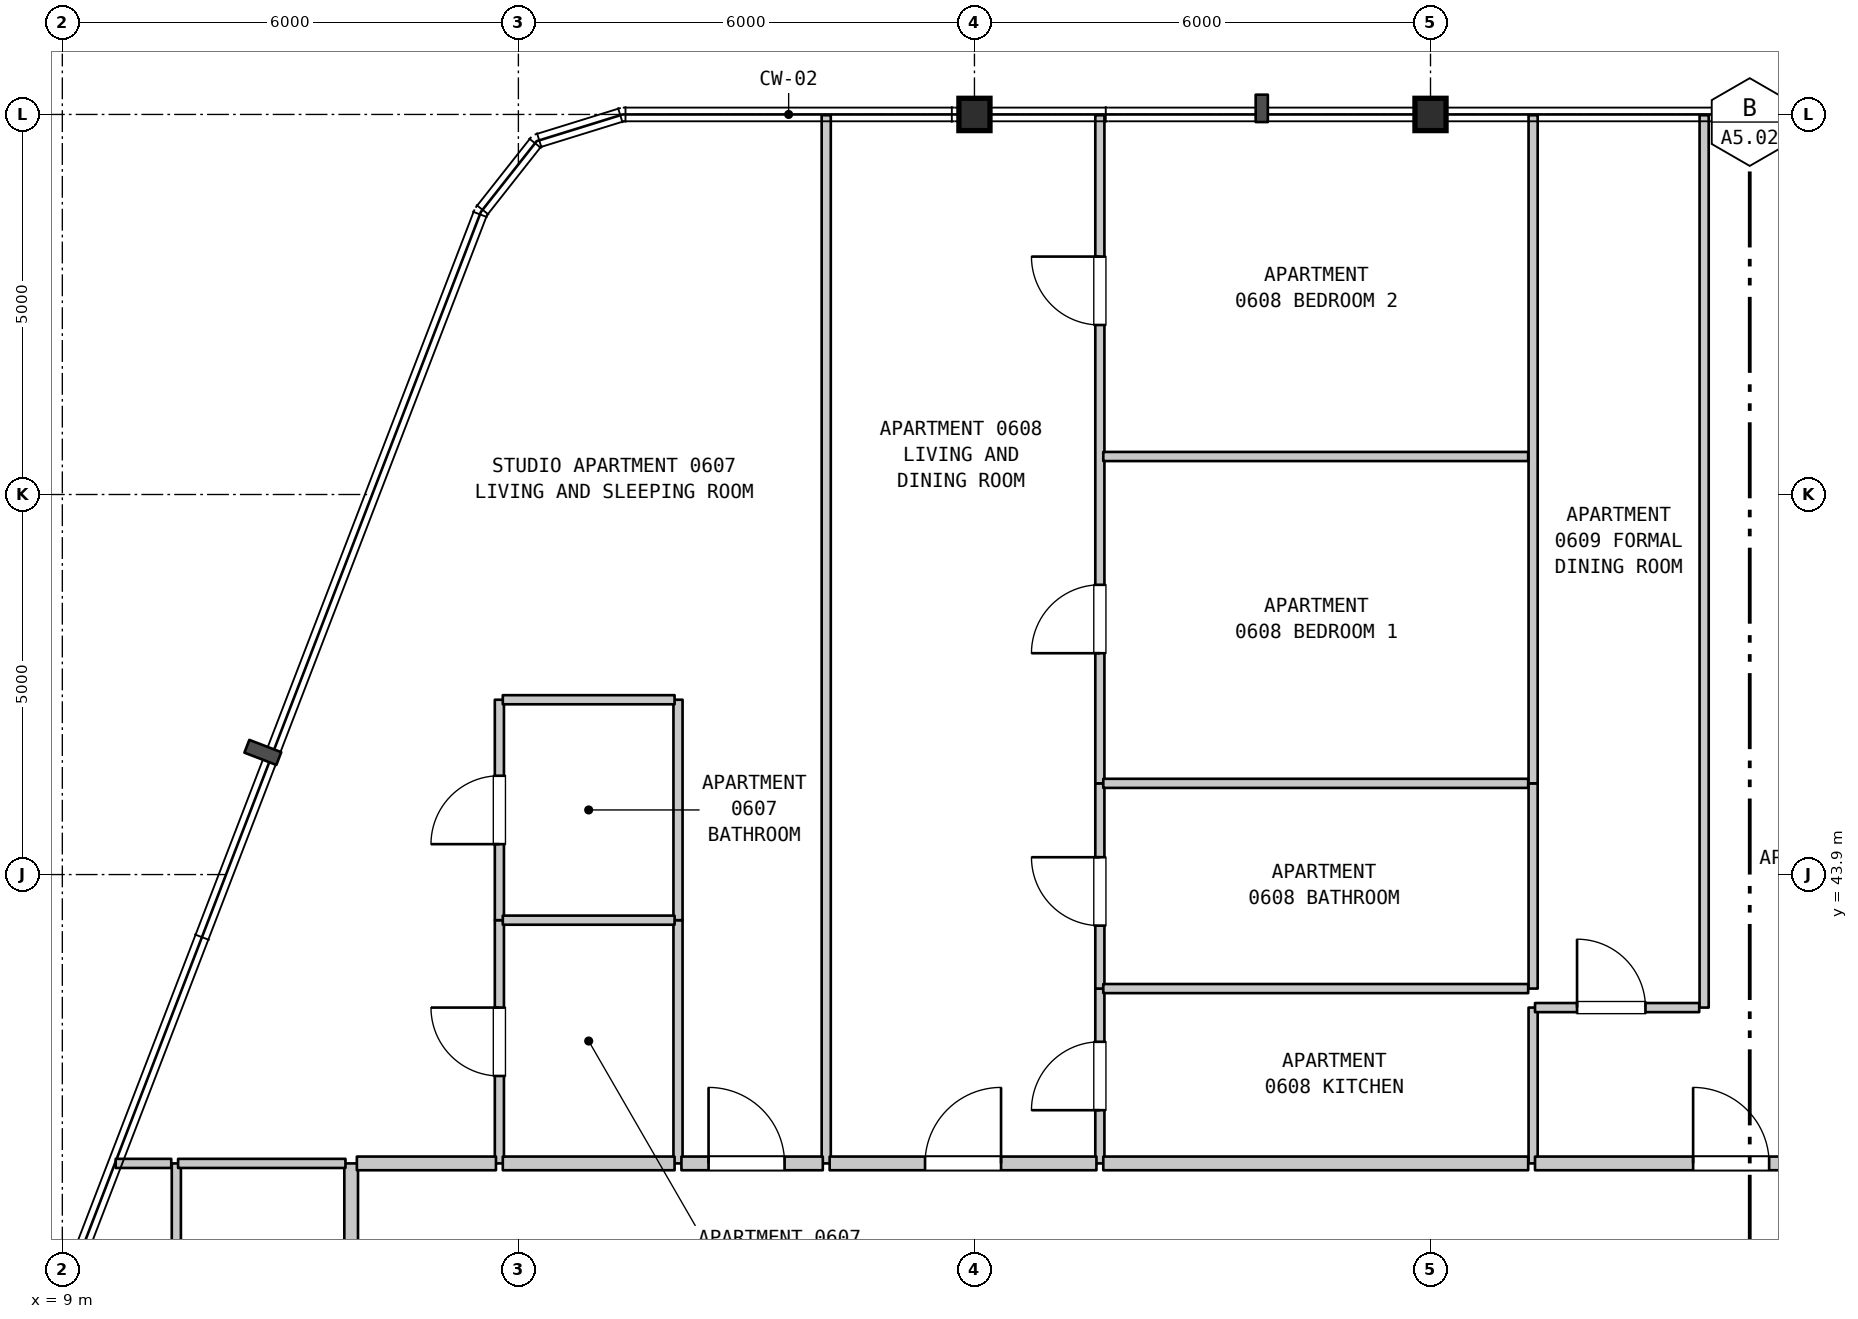
"""IFC4 building model, lengths in metres.
Left out: names, types, materials, properties, quantities, classifications, styles, units other than length and angle.
Written with IfcOpenShell. Run it as: python <this file> out.ifc"""

import sys

from ifc_helpers import new_model, si_unit, direction, frame, frame_2d, origin, origin_2d, place, context, subcontext, project, spatial, rectangle, i_section, extrude, element, fill, save


model = new_model("IFC4")
c1 = context("Model", 3, precision=1e-05, world=origin(), true_north=direction((0.0, 1.0)))
c2 = subcontext(c1, "Body", "Model", "MODEL_VIEW")
j1 = project(units=[si_unit("LENGTHUNIT", "METRE"), si_unit("PLANEANGLEUNIT", "RADIAN")], contexts=[c1])
p1 = place(None, origin())
s1 = spatial("IfcSite", under=j1, at=p1, CompositionType="ELEMENT")
p2 = place(p1, origin())
s2 = spatial("IfcBuilding", under=s1, at=p2, CompositionType="ELEMENT")
p3 = place(p2, frame((0.0, 0.0, 31.4)))
s3 = spatial("IfcBuildingStorey", under=s2, at=p3, CompositionType="ELEMENT", Elevation=31.4)
for number, where, z_axis, x_axis in (
    (1, (21.0, 53.9, 0.0), (0.0, 0.0, 1.0), (1.0, 0.0, 0.0)),
    (2, (27.0, 53.9, 0.0), (0.0, 0.0, 1.0), (1.0, 0.0, 0.0)),
):
    element("IfcColumn", number, at=place(p3, frame(where, z_axis=z_axis, x_axis=x_axis)), inside=s3, PredefinedType="COLUMN", context=c2, shape_type="SweptSolid", body=[
        extrude(i_section(OverallWidth=0.409, OverallDepth=0.425, WebThickness=0.032, FlangeThickness=0.052, FilletRadius=0.015, at=origin_2d()), origin(), (0.0, 0.0, 1.0), 3.7),
    ])
p4 = place(p3, frame((10.5, 31.45, 0.0), z_axis=(0.0, 0.0, 1.0), x_axis=(0.0, 1.0, 0.0)))
e3 = element("IfcWall", 3, at=p4, inside=s3, PredefinedType="PARTITIONING", context=c2, shape_type="SweptSolid", body=[
    extrude(rectangle(XDim=8.65, YDim=0.12, at=frame_2d((4.325, 0.0))), origin(), (0.0, 0.0, 1.0), 3.385),
])
p5 = place(p3, frame((12.8, 31.45, 0.0), z_axis=(0.0, 0.0, 1.0), x_axis=(0.0, 1.0, 0.0)))
e4 = element("IfcWall", 4, at=p5, inside=s3, PredefinedType="STANDARD", context=c2, shape_type="SweptSolid", body=[
    extrude(rectangle(XDim=8.65, YDim=0.18, at=frame_2d((4.325, 0.0))), origin(), (0.0, 0.0, 1.0), 3.385),
])
p6 = place(p3, frame((14.75, 40.1, 0.0), z_axis=(0.0, 0.0, 1.0), x_axis=(0.0, 1.0, 0.0)))
e5 = element("IfcWall", 5, at=p6, inside=s3, PredefinedType="PARTITIONING", context=c2, shape_type="SweptSolid", body=[
    extrude(rectangle(XDim=3.2, YDim=0.12, at=frame_2d((1.6, 0.0))), origin(), (0.0, 0.0, 1.0), 3.385),
])
p7 = place(p6, frame((1.15, 0.0, 0.0)))
e6 = element("IfcOpeningElement", 6, at=p7, cuts=e5, PredefinedType="OPENING", context=c2, shape_type="SweptSolid", body=[
    extrude(rectangle(XDim=0.9, YDim=2.15, at=frame_2d((0.45, 1.075))), frame((0.0, 0.07, 0.0), z_axis=(0.0, -1.0, 0.0), x_axis=(1.0, 0.0, 0.0)), (0.0, 0.0, 1.0), 0.14),
])
p8 = place(p3, frame((14.75, 43.3, 0.0), z_axis=(0.0, 0.0, 1.0), x_axis=(0.0, 1.0, 0.0)))
e7 = element("IfcWall", 7, at=p8, inside=s3, PredefinedType="PARTITIONING", context=c2, shape_type="SweptSolid", body=[
    extrude(rectangle(XDim=2.9, YDim=0.12, at=frame_2d((1.45, 0.0))), origin(), (0.0, 0.0, 1.0), 3.385),
])
p9 = place(p8, frame((1.0, 0.0, 0.0)))
e8 = element("IfcOpeningElement", 8, at=p9, cuts=e7, PredefinedType="OPENING", context=c2, shape_type="SweptSolid", body=[
    extrude(rectangle(XDim=0.9, YDim=2.1, at=frame_2d((0.45, 1.05))), frame((0.0, 0.07, 0.0), z_axis=(0.0, -1.0, 0.0), x_axis=(1.0, 0.0, 0.0)), (0.0, 0.0, 1.0), 0.14),
])
p10 = place(p3, frame((17.1, 40.1, 0.0), z_axis=(0.0, 0.0, 1.0), x_axis=(0.0, 1.0, 0.0)))
e9 = element("IfcWall", 9, at=p10, inside=s3, PredefinedType="PARTITIONING", context=c2, shape_type="SweptSolid", body=[
    extrude(rectangle(XDim=3.2, YDim=0.12, at=frame_2d((1.6, 0.0))), origin(), (0.0, 0.0, 1.0), 3.385),
])
p11 = place(p3, frame((17.1, 43.3, 0.0), z_axis=(0.0, 0.0, 1.0), x_axis=(0.0, 1.0, 0.0)))
e10 = element("IfcWall", 10, at=p11, inside=s3, PredefinedType="PARTITIONING", context=c2, shape_type="SweptSolid", body=[
    extrude(rectangle(XDim=2.9, YDim=0.12, at=frame_2d((1.45, 0.0))), origin(), (0.0, 0.0, 1.0), 3.385),
])
p12 = place(p3, frame((19.05, 40.1, 0.0), z_axis=(0.0, 0.0, 1.0), x_axis=(0.0, 1.0, 0.0)))
e11 = element("IfcWall", 11, at=p12, inside=s3, PredefinedType="PARTITIONING", context=c2, shape_type="SweptSolid", body=[
    extrude(rectangle(XDim=13.79, YDim=0.12, at=frame_2d((6.895, 0.0))), origin(), (0.0, 0.0, 1.0), 3.385),
])
p13 = place(p3, frame((22.65, 40.1, 0.0), z_axis=(0.0, 0.0, 1.0), x_axis=(0.0, 1.0, 0.0)))
e12 = element("IfcWall", 12, at=p13, inside=s3, PredefinedType="PARTITIONING", context=c2, shape_type="SweptSolid", body=[
    extrude(rectangle(XDim=2.3, YDim=0.12, at=frame_2d((1.15, 0.0))), origin(), (0.0, 0.0, 1.0), 3.385),
])
p14 = place(p13, frame((0.7, 0.0, 0.0)))
e13 = element("IfcOpeningElement", 13, at=p14, cuts=e12, PredefinedType="OPENING", context=c2, shape_type="SweptSolid", body=[
    extrude(rectangle(XDim=0.9, YDim=2.15, at=frame_2d((0.45, 1.075))), frame((0.0, 0.07, 0.0), z_axis=(0.0, -1.0, 0.0), x_axis=(1.0, 0.0, 0.0)), (0.0, 0.0, 1.0), 0.14),
])
p15 = place(p3, frame((22.65, 42.4, 0.0), z_axis=(0.0, 0.0, 1.0), x_axis=(0.0, 1.0, 0.0)))
e14 = element("IfcWall", 14, at=p15, inside=s3, PredefinedType="PARTITIONING", context=c2, shape_type="SweptSolid", body=[
    extrude(rectangle(XDim=2.7, YDim=0.12, at=frame_2d((1.35, 0.0))), origin(), (0.0, 0.0, 1.0), 3.385),
])
p16 = place(p15, frame((0.828, 0.0, 0.0)))
e15 = element("IfcOpeningElement", 15, at=p16, cuts=e14, PredefinedType="OPENING", context=c2, shape_type="SweptSolid", body=[
    extrude(rectangle(XDim=0.9, YDim=2.1, at=frame_2d((0.45, 1.05))), frame((0.0, 0.07, 0.0), z_axis=(0.0, -1.0, 0.0), x_axis=(1.0, 0.0, 0.0)), (0.0, 0.0, 1.0), 0.14),
])
p17 = place(p3, frame((22.65, 45.1, 0.0), z_axis=(0.0, 0.0, 1.0), x_axis=(0.0, 1.0, 0.0)))
e16 = element("IfcWall", 16, at=p17, inside=s3, PredefinedType="PARTITIONING", context=c2, shape_type="SweptSolid", body=[
    extrude(rectangle(XDim=8.79, YDim=0.12, at=frame_2d((4.395, 0.0))), origin(), (0.0, 0.0, 1.0), 3.385),
])
p18 = place(p17, frame((1.712, 0.0, 0.0)))
e17 = element("IfcOpeningElement", 17, at=p18, cuts=e16, PredefinedType="OPENING", context=c2, shape_type="SweptSolid", body=[
    extrude(rectangle(XDim=0.9, YDim=2.15, at=frame_2d((0.45, 1.075))), frame((0.0, 0.07, 0.0), z_axis=(0.0, -1.0, 0.0), x_axis=(1.0, 0.0, 0.0)), (0.0, 0.0, 1.0), 0.14),
])
p19 = place(p17, frame((6.03, 0.0, 0.0)))
e18 = element("IfcOpeningElement", 18, at=p19, cuts=e16, PredefinedType="OPENING", context=c2, shape_type="SweptSolid", body=[
    extrude(rectangle(XDim=0.9, YDim=2.15, at=frame_2d((0.45, 1.075))), frame((0.0, 0.07, 0.0), z_axis=(0.0, -1.0, 0.0), x_axis=(1.0, 0.0, 0.0)), (0.0, 0.0, 1.0), 0.14),
])
p20 = place(p3, frame((28.35, 40.1, 0.0), z_axis=(0.0, 0.0, 1.0), x_axis=(0.0, 1.0, 0.0)))
e19 = element("IfcWall", 19, at=p20, inside=s3, PredefinedType="PARTITIONING", context=c2, shape_type="SweptSolid", body=[
    extrude(rectangle(XDim=2.05, YDim=0.12, at=frame_2d((1.025, 0.0))), origin(), (0.0, 0.0, 1.0), 3.385),
])
p21 = place(p3, frame((28.35, 42.4, 0.0), z_axis=(0.0, 0.0, 1.0), x_axis=(0.0, 1.0, 0.0)))
e20 = element("IfcWall", 20, at=p21, inside=s3, PredefinedType="PARTITIONING", context=c2, shape_type="SweptSolid", body=[
    extrude(rectangle(XDim=2.7, YDim=0.12, at=frame_2d((1.35, 0.0))), origin(), (0.0, 0.0, 1.0), 3.385),
])
p22 = place(p3, frame((28.35, 45.1, 0.0), z_axis=(0.0, 0.0, 1.0), x_axis=(0.0, 1.0, 0.0)))
e21 = element("IfcWall", 21, at=p22, inside=s3, PredefinedType="PARTITIONING", context=c2, shape_type="SweptSolid", body=[
    extrude(rectangle(XDim=8.79, YDim=0.12, at=frame_2d((4.395, 0.0))), origin(), (0.0, 0.0, 1.0), 3.385),
])
p23 = place(p3, frame((30.6, 42.15, 0.0), z_axis=(0.0, 0.0, 1.0), x_axis=(0.0, 1.0, 0.0)))
e22 = element("IfcWall", 22, at=p23, inside=s3, PredefinedType="PARTITIONING", context=c2, shape_type="SweptSolid", body=[
    extrude(rectangle(XDim=11.74, YDim=0.12, at=frame_2d((5.87, 0.0))), origin(), (0.0, 0.0, 1.0), 3.385),
])
p24 = place(p3, frame((9.702, 40.1, 0.0), z_axis=(0.0, 0.0, 1.0), x_axis=(1.0, 0.0, 0.0)))
e23 = element("IfcWall", 23, at=p24, inside=s3, PredefinedType="PARTITIONING", context=c2, shape_type="SweptSolid", body=[
    extrude(rectangle(XDim=0.731, YDim=0.12, at=frame_2d((0.366, 0.0))), origin(), (0.0, 0.0, 1.0), 3.385),
])
p25 = place(p3, frame((10.523, 40.1, 0.0), z_axis=(0.0, 0.0, 1.0), x_axis=(1.0, 0.0, 0.0)))
e24 = element("IfcWall", 24, at=p25, inside=s3, PredefinedType="PARTITIONING", context=c2, shape_type="SweptSolid", body=[
    extrude(rectangle(XDim=2.202, YDim=0.12, at=frame_2d((1.101, 0.0))), origin(), (0.0, 0.0, 1.0), 3.385),
])
p26 = place(p3, frame((12.875, 40.1, 0.0), z_axis=(0.0, 0.0, 1.0), x_axis=(1.0, 0.0, 0.0)))
e25 = element("IfcWall", 25, at=p26, inside=s3, PredefinedType="STANDARD", context=c2, shape_type="SweptSolid", body=[
    extrude(rectangle(XDim=1.83, YDim=0.18, at=frame_2d((0.915, 0.0))), origin(), (0.0, 0.0, 1.0), 3.385),
])
p27 = place(p3, frame((14.795, 40.1, 0.0), z_axis=(0.0, 0.0, 1.0), x_axis=(1.0, 0.0, 0.0)))
e26 = element("IfcWall", 26, at=p27, inside=s3, PredefinedType="STANDARD", context=c2, shape_type="SweptSolid", body=[
    extrude(rectangle(XDim=2.26, YDim=0.18, at=frame_2d((1.13, 0.0))), origin(), (0.0, 0.0, 1.0), 3.385),
])
p28 = place(p3, frame((17.145, 40.1, 0.0), z_axis=(0.0, 0.0, 1.0), x_axis=(1.0, 0.0, 0.0)))
e27 = element("IfcWall", 27, at=p28, inside=s3, PredefinedType="STANDARD", context=c2, shape_type="SweptSolid", body=[
    extrude(rectangle(XDim=1.86, YDim=0.18, at=frame_2d((0.93, 0.0))), origin(), (0.0, 0.0, 1.0), 3.385),
])
p29 = place(p28, frame((0.357, 0.0, 0.0)))
e28 = element("IfcOpeningElement", 28, at=p29, cuts=e27, PredefinedType="OPENING", context=c2, shape_type="SweptSolid", body=[
    extrude(rectangle(XDim=1.0, YDim=2.15, at=frame_2d((0.5, 1.075))), frame((0.0, 0.1, 0.0), z_axis=(0.0, -1.0, 0.0), x_axis=(1.0, 0.0, 0.0)), (0.0, 0.0, 1.0), 0.2),
])
p30 = place(p3, frame((19.095, 40.1, 0.0), z_axis=(0.0, 0.0, 1.0), x_axis=(1.0, 0.0, 0.0)))
e29 = element("IfcWall", 29, at=p30, inside=s3, PredefinedType="STANDARD", context=c2, shape_type="SweptSolid", body=[
    extrude(rectangle(XDim=3.51, YDim=0.18, at=frame_2d((1.755, 0.0))), origin(), (0.0, 0.0, 1.0), 3.385),
])
p31 = place(p30, frame((1.255, 0.0, 0.0)))
e30 = element("IfcOpeningElement", 30, at=p31, cuts=e29, PredefinedType="OPENING", context=c2, shape_type="SweptSolid", body=[
    extrude(rectangle(XDim=1.0, YDim=2.15, at=frame_2d((0.5, 1.075))), frame((0.0, 0.1, 0.0), z_axis=(0.0, -1.0, 0.0), x_axis=(1.0, 0.0, 0.0)), (0.0, 0.0, 1.0), 0.2),
])
p32 = place(p3, frame((22.695, 40.1, 0.0), z_axis=(0.0, 0.0, 1.0), x_axis=(1.0, 0.0, 0.0)))
e31 = element("IfcWall", 31, at=p32, inside=s3, PredefinedType="STANDARD", context=c2, shape_type="SweptSolid", body=[
    extrude(rectangle(XDim=5.59, YDim=0.18, at=frame_2d((2.795, 0.0))), origin(), (0.0, 0.0, 1.0), 3.385),
])
p33 = place(p3, frame((28.375, 40.1, 0.0), z_axis=(0.0, 0.0, 1.0), x_axis=(1.0, 0.0, 0.0)))
e32 = element("IfcWall", 32, at=p33, inside=s3, PredefinedType="STANDARD", context=c2, shape_type="SweptSolid", body=[
    extrude(rectangle(XDim=5.095, YDim=0.18, at=frame_2d((2.547, 0.0))), origin(), (0.0, 0.0, 1.0), 3.385),
])
p34 = place(p33, frame((2.08, 0.0, 0.0)))
e33 = element("IfcOpeningElement", 33, at=p34, cuts=e32, PredefinedType="OPENING", context=c2, shape_type="SweptSolid", body=[
    extrude(rectangle(XDim=1.0, YDim=2.15, at=frame_2d((0.5, 1.075))), frame((0.0, 0.1, 0.0), z_axis=(0.0, -1.0, 0.0), x_axis=(1.0, 0.0, 0.0)), (0.0, 0.0, 1.0), 0.2),
])
p35 = place(p3, frame((28.375, 42.15, 0.0), z_axis=(0.0, 0.0, 1.0), x_axis=(1.0, 0.0, 0.0)))
e34 = element("IfcWall", 34, at=p35, inside=s3, PredefinedType="PARTITIONING", context=c2, shape_type="SweptSolid", body=[
    extrude(rectangle(XDim=2.16, YDim=0.12, at=frame_2d((1.08, 0.0))), origin(), (0.0, 0.0, 1.0), 3.385),
])
p36 = place(p35, frame((0.553, 0.0, 0.0)))
e35 = element("IfcOpeningElement", 35, at=p36, cuts=e34, PredefinedType="OPENING", context=c2, shape_type="SweptSolid", body=[
    extrude(rectangle(XDim=0.9, YDim=2.15, at=frame_2d((0.45, 1.075))), frame((0.0, 0.07, 0.0), z_axis=(0.0, -1.0, 0.0), x_axis=(1.0, 0.0, 0.0)), (0.0, 0.0, 1.0), 0.14),
])
p37 = place(p3, frame((22.695, 42.4, 0.0), z_axis=(0.0, 0.0, 1.0), x_axis=(1.0, 0.0, 0.0)))
e36 = element("IfcWall", 36, at=p37, inside=s3, PredefinedType="PARTITIONING", context=c2, shape_type="SweptSolid", body=[
    extrude(rectangle(XDim=5.59, YDim=0.12, at=frame_2d((2.795, 0.0))), origin(), (0.0, 0.0, 1.0), 3.385),
])
p38 = place(p3, frame((14.795, 43.3, 0.0), z_axis=(0.0, 0.0, 1.0), x_axis=(1.0, 0.0, 0.0)))
e37 = element("IfcWall", 37, at=p38, inside=s3, PredefinedType="PARTITIONING", context=c2, shape_type="SweptSolid", body=[
    extrude(rectangle(XDim=2.26, YDim=0.12, at=frame_2d((1.13, 0.0))), origin(), (0.0, 0.0, 1.0), 3.385),
])
p39 = place(p3, frame((22.695, 45.1, 0.0), z_axis=(0.0, 0.0, 1.0), x_axis=(1.0, 0.0, 0.0)))
e38 = element("IfcWall", 38, at=p39, inside=s3, PredefinedType="PARTITIONING", context=c2, shape_type="SweptSolid", body=[
    extrude(rectangle(XDim=5.59, YDim=0.12, at=frame_2d((2.795, 0.0))), origin(), (0.0, 0.0, 1.0), 3.385),
])
p40 = place(p3, frame((14.795, 46.2, 0.0), z_axis=(0.0, 0.0, 1.0), x_axis=(1.0, 0.0, 0.0)))
e39 = element("IfcWall", 39, at=p40, inside=s3, PredefinedType="PARTITIONING", context=c2, shape_type="SweptSolid", body=[
    extrude(rectangle(XDim=2.26, YDim=0.12, at=frame_2d((1.13, 0.0))), origin(), (0.0, 0.0, 1.0), 3.385),
])
p41 = place(p3, frame((22.695, 49.4, 0.0), z_axis=(0.0, 0.0, 1.0), x_axis=(1.0, 0.0, 0.0)))
e40 = element("IfcWall", 40, at=p41, inside=s3, PredefinedType="PARTITIONING", context=c2, shape_type="SweptSolid", body=[
    extrude(rectangle(XDim=5.59, YDim=0.12, at=frame_2d((2.795, 0.0))), origin(), (0.0, 0.0, 1.0), 3.385),
])
p42 = place(p7, origin())
e41 = element("IfcDoor", 41, at=p42, inside=s3, OperationType="SINGLE_SWING_RIGHT", PredefinedType="DOOR", context=c2, shape_type="SweptSolid", body=[
    extrude(rectangle(XDim=0.9, YDim=2.15, at=frame_2d((0.45, 1.075))), frame((0.0, 0.025, 0.0), z_axis=(0.0, -1.0, 0.0), x_axis=(1.0, 0.0, 0.0)), (0.0, 0.0, 1.0), 0.05),
])
fill(e6, e41)
p43 = place(p9, origin())
e42 = element("IfcDoor", 42, at=p43, inside=s3, OperationType="SINGLE_SWING_LEFT", PredefinedType="DOOR", context=c2, shape_type="SweptSolid", body=[
    extrude(rectangle(XDim=0.9, YDim=2.1, at=frame_2d((0.45, 1.05))), frame((0.0, 0.025, 0.0), z_axis=(0.0, -1.0, 0.0), x_axis=(1.0, 0.0, 0.0)), (0.0, 0.0, 1.0), 0.05),
])
fill(e8, e42)
p44 = place(p14, origin())
e43 = element("IfcDoor", 43, at=p44, inside=s3, OperationType="SINGLE_SWING_LEFT", PredefinedType="DOOR", context=c2, shape_type="SweptSolid", body=[
    extrude(rectangle(XDim=0.9, YDim=2.15, at=frame_2d((0.45, 1.075))), frame((0.0, 0.025, 0.0), z_axis=(0.0, -1.0, 0.0), x_axis=(1.0, 0.0, 0.0)), (0.0, 0.0, 1.0), 0.05),
])
fill(e13, e43)
p45 = place(p16, origin())
e44 = element("IfcDoor", 44, at=p45, inside=s3, OperationType="SINGLE_SWING_RIGHT", PredefinedType="DOOR", context=c2, shape_type="SweptSolid", body=[
    extrude(rectangle(XDim=0.9, YDim=2.1, at=frame_2d((0.45, 1.05))), frame((0.0, 0.025, 0.0), z_axis=(0.0, -1.0, 0.0), x_axis=(1.0, 0.0, 0.0)), (0.0, 0.0, 1.0), 0.05),
])
fill(e15, e44)
p46 = place(p18, origin())
e45 = element("IfcDoor", 45, at=p46, inside=s3, OperationType="SINGLE_SWING_LEFT", PredefinedType="DOOR", context=c2, shape_type="SweptSolid", body=[
    extrude(rectangle(XDim=0.9, YDim=2.15, at=frame_2d((0.45, 1.075))), frame((0.0, 0.025, 0.0), z_axis=(0.0, -1.0, 0.0), x_axis=(1.0, 0.0, 0.0)), (0.0, 0.0, 1.0), 0.05),
])
fill(e17, e45)
p47 = place(p19, origin())
e46 = element("IfcDoor", 46, at=p47, inside=s3, OperationType="SINGLE_SWING_RIGHT", PredefinedType="DOOR", context=c2, shape_type="SweptSolid", body=[
    extrude(rectangle(XDim=0.9, YDim=2.15, at=frame_2d((0.45, 1.075))), frame((0.0, 0.025, 0.0), z_axis=(0.0, -1.0, 0.0), x_axis=(1.0, 0.0, 0.0)), (0.0, 0.0, 1.0), 0.05),
])
fill(e18, e46)
p48 = place(p29, origin())
e47 = element("IfcDoor", 47, at=p48, inside=s3, OperationType="SINGLE_SWING_LEFT", PredefinedType="DOOR", context=c2, shape_type="SweptSolid", body=[
    extrude(rectangle(XDim=1.0, YDim=2.15, at=frame_2d((0.5, 1.075))), frame((0.0, 0.025, 0.0), z_axis=(0.0, -1.0, 0.0), x_axis=(1.0, 0.0, 0.0)), (0.0, 0.0, 1.0), 0.05),
])
fill(e28, e47)
p49 = place(p31, origin())
e48 = element("IfcDoor", 48, at=p49, inside=s3, OperationType="SINGLE_SWING_RIGHT", PredefinedType="DOOR", context=c2, shape_type="SweptSolid", body=[
    extrude(rectangle(XDim=1.0, YDim=2.15, at=frame_2d((0.5, 1.075))), frame((0.0, 0.025, 0.0), z_axis=(0.0, -1.0, 0.0), x_axis=(1.0, 0.0, 0.0)), (0.0, 0.0, 1.0), 0.05),
])
fill(e30, e48)
p50 = place(p34, origin())
e49 = element("IfcDoor", 49, at=p50, inside=s3, OperationType="SINGLE_SWING_LEFT", PredefinedType="DOOR", context=c2, shape_type="SweptSolid", body=[
    extrude(rectangle(XDim=1.0, YDim=2.15, at=frame_2d((0.5, 1.075))), frame((0.0, 0.025, 0.0), z_axis=(0.0, -1.0, 0.0), x_axis=(1.0, 0.0, 0.0)), (0.0, 0.0, 1.0), 0.05),
])
fill(e33, e49)
p51 = place(p36, origin())
e50 = element("IfcDoor", 50, at=p51, inside=s3, OperationType="SINGLE_SWING_LEFT", PredefinedType="DOOR", context=c2, shape_type="SweptSolid", body=[
    extrude(rectangle(XDim=0.9, YDim=2.15, at=frame_2d((0.45, 1.075))), frame((0.0, 0.025, 0.0), z_axis=(0.0, -1.0, 0.0), x_axis=(1.0, 0.0, 0.0)), (0.0, 0.0, 1.0), 0.05),
])
fill(e35, e50)
save(model, sys.argv[1])
